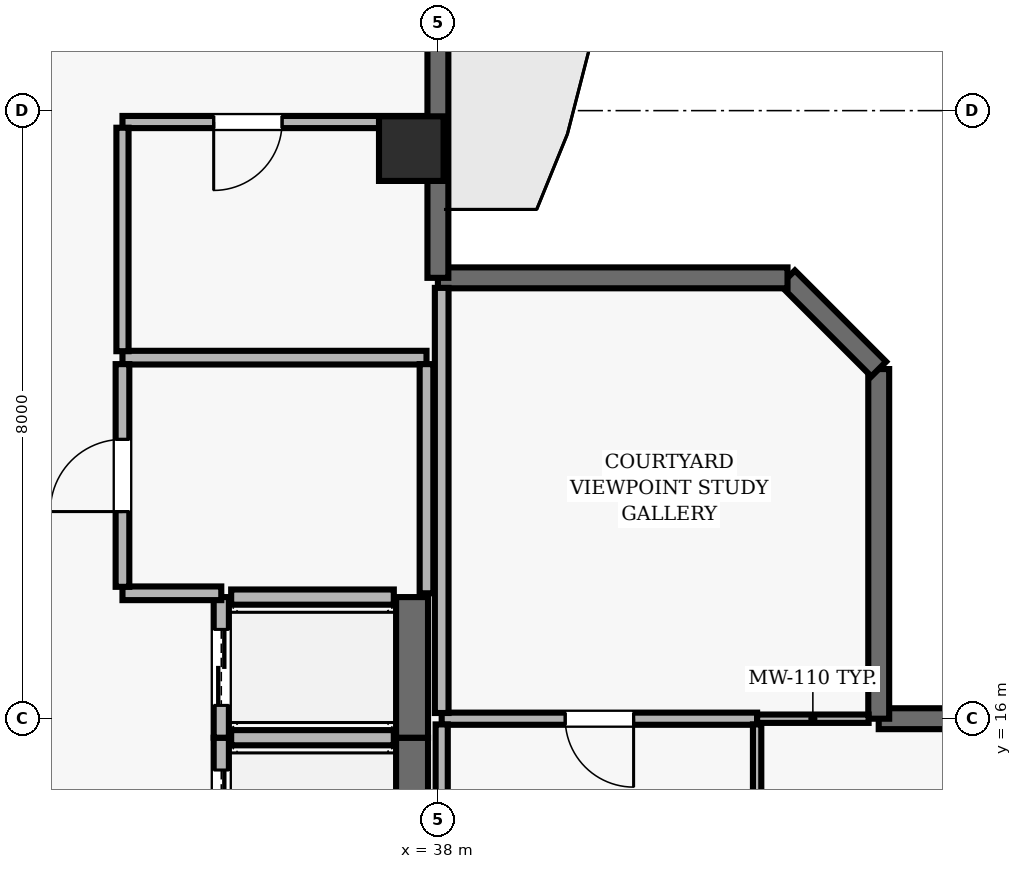
"""IFC4 building model, lengths in metres.
Left out: names, types, materials, properties, quantities, classifications, styles, units other than length and angle.
Written with IfcOpenShell. Run it as: python <this file> out.ifc"""

import sys

from ifc_helpers import new_model, si_unit, direction, frame, frame_2d, origin, origin_2d, place, context, subcontext, project, spatial, rectangle, extrude, element, fill, save


model = new_model("IFC4")
c1 = context("Model", 3, precision=1e-05, world=origin(), true_north=direction((0.0, 1.0)))
c2 = subcontext(c1, "Body", "Model", "MODEL_VIEW")
j1 = project(units=[si_unit("LENGTHUNIT", "METRE"), si_unit("PLANEANGLEUNIT", "RADIAN")], contexts=[c1])
p1 = place(None, origin())
s1 = spatial("IfcSite", under=j1, at=p1, CompositionType="ELEMENT")
p2 = place(p1, origin())
s2 = spatial("IfcBuilding", under=s1, at=p2, CompositionType="ELEMENT")
p3 = place(p2, frame((0.0, 0.0, 306.7)))
s3 = spatial("IfcBuildingStorey", under=s2, at=p3, CompositionType="ELEMENT", Elevation=306.7)
p4 = place(p3, frame((37.65, 23.5, 0.0), z_axis=(0.0, 0.0, 1.0), x_axis=(1.0, 0.0, 0.0)))
e1 = element("IfcColumn", 1, at=p4, inside=s3, PredefinedType="COLUMN", context=c2, shape_type="SweptSolid", body=[
    extrude(rectangle(XDim=0.85, YDim=0.85, at=origin_2d()), origin(), (0.0, 0.0, 1.0), 5.0),
])
p5 = place(p3, frame((57.3, 16.0, 0.0), z_axis=(0.0, 0.0, 1.0), x_axis=(-1.0, 0.0, 0.0)))
e2 = element("IfcWall", 2, at=p5, inside=s3, PredefinedType="SOLIDWALL", context=c2, shape_type="SweptSolid", body=[
    extrude(rectangle(XDim=13.5, YDim=0.275, at=frame_2d((6.75, 0.0))), origin(), (0.0, 0.0, 1.0), 4.74),
])
p6 = place(p5, frame((7.05, 0.0, 0.0)))
e3 = element("IfcOpeningElement", 3, at=p6, cuts=e2, PredefinedType="OPENING", context=c2, shape_type="SweptSolid", body=[
    extrude(rectangle(XDim=1.0, YDim=2.2, at=frame_2d((0.5, 1.1))), frame((0.0, 0.147, 0.0), z_axis=(0.0, -1.0, 0.0), x_axis=(1.0, 0.0, 0.0)), (0.0, 0.0, 1.0), 0.295),
])
p7 = place(p5, frame((2.175, 0.0, 0.9)))
e4 = element("IfcOpeningElement", 4, at=p7, cuts=e2, PredefinedType="OPENING", context=c2, shape_type="SweptSolid", body=[
    extrude(rectangle(XDim=2.4, YDim=1.8, at=frame_2d((1.2, 0.9))), frame((0.0, 0.147, 0.0), z_axis=(0.0, -1.0, 0.0), x_axis=(1.0, 0.0, 0.0)), (0.0, 0.0, 1.0), 0.295),
])
p8 = place(p3, frame((43.8, 16.0, 0.0), z_axis=(0.0, 0.0, 1.0), x_axis=(0.0, 1.0, 0.0)))
e5 = element("IfcWall", 5, at=p8, inside=s3, PredefinedType="SOLIDWALL", context=c2, shape_type="SweptSolid", body=[
    extrude(rectangle(XDim=4.6, YDim=0.275, at=frame_2d((2.3, 0.0))), origin(), (0.0, 0.0, 1.0), 4.74),
])
p9 = place(p3, frame((43.8, 20.6, 0.0), z_axis=(0.0, 0.0, 1.0), x_axis=(-0.707106781187, 0.707106781187, 0.0)))
e6 = element("IfcWall", 6, at=p9, inside=s3, PredefinedType="SOLIDWALL", context=c2, shape_type="SweptSolid", body=[
    extrude(rectangle(XDim=1.697, YDim=0.275, at=frame_2d((0.849, 0.0))), origin(), (0.0, 0.0, 1.0), 4.74),
])
p10 = place(p3, frame((42.6, 21.8, 0.0), z_axis=(0.0, 0.0, 1.0), x_axis=(-1.0, 0.0, 0.0)))
e7 = element("IfcWall", 7, at=p10, inside=s3, PredefinedType="SOLIDWALL", context=c2, shape_type="SweptSolid", body=[
    extrude(rectangle(XDim=4.6, YDim=0.275, at=frame_2d((2.3, 0.0))), origin(), (0.0, 0.0, 1.0), 4.74),
])
p11 = place(p3, frame((38.0, 21.8, 0.0), z_axis=(0.0, 0.0, 1.0), x_axis=(0.0, 1.0, 0.0)))
e8 = element("IfcWall", 8, at=p11, inside=s3, PredefinedType="SOLIDWALL", context=c2, shape_type="SweptSolid", body=[
    extrude(rectangle(XDim=13.5, YDim=0.275, at=frame_2d((6.75, 0.0))), origin(), (0.0, 0.0, 1.0), 4.74),
])
p12 = place(p11, frame((5.25, 0.0, 0.0)))
e9 = element("IfcOpeningElement", 9, at=p12, cuts=e8, PredefinedType="OPENING", context=c2, shape_type="SweptSolid", body=[
    extrude(rectangle(XDim=1.0, YDim=2.2, at=frame_2d((0.5, 1.1))), frame((0.0, 0.147, 0.0), z_axis=(0.0, -1.0, 0.0), x_axis=(1.0, 0.0, 0.0)), (0.0, 0.0, 1.0), 0.295),
])
p13 = place(p11, frame((8.625, 0.0, 0.9)))
e10 = element("IfcOpeningElement", 10, at=p13, cuts=e8, PredefinedType="OPENING", context=c2, shape_type="SweptSolid", body=[
    extrude(rectangle(XDim=3.0, YDim=2.2, at=frame_2d((1.5, 1.1))), frame((0.0, 0.147, 0.0), z_axis=(0.0, -1.0, 0.0), x_axis=(1.0, 0.0, 0.0)), (0.0, 0.0, 1.0), 0.295),
])
p14 = place(p3, frame((35.15, 15.75, 0.0), z_axis=(0.0, 0.0, 1.0), x_axis=(0.0, -1.0, 0.0)))
e11 = element("IfcWall", 11, at=p14, inside=s3, PredefinedType="SOLIDWALL", context=c2, shape_type="SweptSolid", body=[
    extrude(rectangle(XDim=1.85, YDim=0.2, at=frame_2d((0.925, 0.0))), origin(), (0.0, 0.0, 1.0), 4.74),
])
p15 = place(p14, frame((0.425, 0.0, 0.0)))
e12 = element("IfcOpeningElement", 12, at=p15, cuts=e11, PredefinedType="OPENING", context=c2, shape_type="SweptSolid", body=[
    extrude(rectangle(XDim=1.0, YDim=2.1, at=frame_2d((0.5, 1.05))), frame((0.0, 0.11, 0.0), z_axis=(0.0, -1.0, 0.0), x_axis=(1.0, 0.0, 0.0)), (0.0, 0.0, 1.0), 0.22),
])
p16 = place(p3, frame((37.66, 13.9, 0.0), z_axis=(0.0, 0.0, 1.0), x_axis=(0.0, 1.0, 0.0)))
e13 = element("IfcWall", 13, at=p16, inside=s3, PredefinedType="SHEAR", context=c2, shape_type="SweptSolid", body=[
    extrude(rectangle(XDim=1.85, YDim=0.42, at=frame_2d((0.925, 0.0))), origin(), (0.0, 0.0, 1.0), 4.74),
])
p17 = place(p3, frame((37.42, 15.75, 0.0), z_axis=(0.0, 0.0, 1.0), x_axis=(-1.0, 0.0, 0.0)))
e14 = element("IfcWall", 14, at=p17, inside=s3, PredefinedType="SOLIDWALL", context=c2, shape_type="SweptSolid", body=[
    extrude(rectangle(XDim=2.14, YDim=0.2, at=frame_2d((1.07, 0.0))), origin(), (0.0, 0.0, 1.0), 4.74),
])
p18 = place(p3, frame((35.15, 17.6, 0.0), z_axis=(0.0, 0.0, 1.0), x_axis=(0.0, -1.0, 0.0)))
e15 = element("IfcWall", 15, at=p18, inside=s3, PredefinedType="SOLIDWALL", context=c2, shape_type="SweptSolid", body=[
    extrude(rectangle(XDim=1.85, YDim=0.2, at=frame_2d((0.925, 0.0))), origin(), (0.0, 0.0, 1.0), 4.74),
])
p19 = place(p18, frame((0.425, 0.0, 0.0)))
e16 = element("IfcOpeningElement", 16, at=p19, cuts=e15, PredefinedType="OPENING", context=c2, shape_type="SweptSolid", body=[
    extrude(rectangle(XDim=1.0, YDim=2.1, at=frame_2d((0.5, 1.05))), frame((0.0, 0.11, 0.0), z_axis=(0.0, -1.0, 0.0), x_axis=(1.0, 0.0, 0.0)), (0.0, 0.0, 1.0), 0.22),
])
p20 = place(p3, frame((37.66, 15.75, 0.0), z_axis=(0.0, 0.0, 1.0), x_axis=(0.0, 1.0, 0.0)))
e17 = element("IfcWall", 17, at=p20, inside=s3, PredefinedType="SHEAR", context=c2, shape_type="SweptSolid", body=[
    extrude(rectangle(XDim=1.85, YDim=0.42, at=frame_2d((0.925, 0.0))), origin(), (0.0, 0.0, 1.0), 4.74),
])
p21 = place(p3, frame((37.42, 17.6, 0.0), z_axis=(0.0, 0.0, 1.0), x_axis=(-1.0, 0.0, 0.0)))
e18 = element("IfcWall", 18, at=p21, inside=s3, PredefinedType="SOLIDWALL", context=c2, shape_type="SweptSolid", body=[
    extrude(rectangle(XDim=2.14, YDim=0.2, at=frame_2d((1.07, 0.0))), origin(), (0.0, 0.0, 1.0), 4.74),
])
p22 = place(p3, frame((33.85, 17.65, 0.0), z_axis=(0.0, 0.0, 1.0), x_axis=(1.0, 0.0, 0.0)))
e19 = element("IfcWall", 19, at=p22, inside=s3, PredefinedType="PARTITIONING", context=c2, shape_type="SweptSolid", body=[
    extrude(rectangle(XDim=1.3, YDim=0.18, at=frame_2d((0.65, 0.0))), origin(), (0.0, 0.0, 1.0), 4.74),
])
p23 = place(p3, frame((37.85, 20.75, 0.0), z_axis=(0.0, 0.0, 1.0), x_axis=(-1.0, 0.0, 0.0)))
e20 = element("IfcWall", 20, at=p23, inside=s3, PredefinedType="PARTITIONING", context=c2, shape_type="SweptSolid", body=[
    extrude(rectangle(XDim=4.0, YDim=0.18, at=frame_2d((2.0, 0.0))), origin(), (0.0, 0.0, 1.0), 4.74),
])
p24 = place(p3, frame((37.85, 23.85, 0.0), z_axis=(0.0, 0.0, 1.0), x_axis=(-1.0, 0.0, 0.0)))
e21 = element("IfcWall", 21, at=p24, inside=s3, PredefinedType="PARTITIONING", context=c2, shape_type="SweptSolid", body=[
    extrude(rectangle(XDim=4.0, YDim=0.16, at=frame_2d((2.0, 0.0))), origin(), (0.0, 0.0, 1.0), 4.277),
])
p25 = place(p24, frame((1.9, 0.0, 0.0)))
e22 = element("IfcOpeningElement", 22, at=p25, cuts=e21, PredefinedType="OPENING", context=c2, shape_type="SweptSolid", body=[
    extrude(rectangle(XDim=0.9, YDim=2.1, at=frame_2d((0.45, 1.05))), frame((0.0, 0.09, 0.0), z_axis=(0.0, -1.0, 0.0), x_axis=(1.0, 0.0, 0.0)), (0.0, 0.0, 1.0), 0.18),
])
p26 = place(p3, frame((42.2, 16.0, 0.0), z_axis=(0.0, 0.0, 1.0), x_axis=(-1.0, 0.0, 0.0)))
e23 = element("IfcWall", 23, at=p26, inside=s3, PredefinedType="PARTITIONING", context=c2, shape_type="SweptSolid", body=[
    extrude(rectangle(XDim=4.15, YDim=0.16, at=frame_2d((2.075, 0.0))), origin(), (0.0, 0.0, 1.0), 4.44),
])
p27 = place(p26, frame((1.625, 0.0, 0.0)))
e24 = element("IfcOpeningElement", 24, at=p27, cuts=e23, PredefinedType="OPENING", context=c2, shape_type="SweptSolid", body=[
    extrude(rectangle(XDim=0.9, YDim=2.1, at=frame_2d((0.45, 1.05))), frame((0.0, 0.09, 0.0), z_axis=(0.0, -1.0, 0.0), x_axis=(1.0, 0.0, 0.0)), (0.0, 0.0, 1.0), 0.18),
])
p28 = place(p3, frame((42.2, 16.0, 0.0), z_axis=(0.0, 0.0, 1.0), x_axis=(1.0, 0.0, 0.0)))
e25 = element("IfcWall", 25, at=p28, inside=s3, PredefinedType="MOVABLE", context=c2, shape_type="SweptSolid", body=[
    extrude(rectangle(XDim=1.467, YDim=0.11, at=frame_2d((0.733, 0.0))), origin(), (0.0, 0.0, 1.0), 4.44),
])
p29 = place(p3, frame((33.85, 17.735, 0.0), z_axis=(0.0, 0.0, 1.0), x_axis=(0.0, 1.0, 0.0)))
e26 = element("IfcWall", 26, at=p29, inside=s3, PredefinedType="PARTITIONING", context=c2, shape_type="SweptSolid", body=[
    extrude(rectangle(XDim=2.93, YDim=0.18, at=frame_2d((1.465, 0.0))), origin(), (0.0, 0.0, 1.0), 4.74),
])
p30 = place(p29, frame((0.99, 0.0, 0.0)))
e27 = element("IfcOpeningElement", 27, at=p30, cuts=e26, PredefinedType="OPENING", context=c2, shape_type="SweptSolid", body=[
    extrude(rectangle(XDim=0.95, YDim=2.1, at=frame_2d((0.475, 1.05))), frame((0.0, 0.1, 0.0), z_axis=(0.0, -1.0, 0.0), x_axis=(1.0, 0.0, 0.0)), (0.0, 0.0, 1.0), 0.2),
])
p31 = place(p3, frame((33.85, 20.835, 0.0), z_axis=(0.0, 0.0, 1.0), x_axis=(0.0, 1.0, 0.0)))
e28 = element("IfcWall", 28, at=p31, inside=s3, PredefinedType="PARTITIONING", context=c2, shape_type="SweptSolid", body=[
    extrude(rectangle(XDim=2.94, YDim=0.16, at=frame_2d((1.47, 0.0))), origin(), (0.0, 0.0, 1.0), 4.74),
])
p32 = place(p3, frame((37.85, 17.65, 0.0), z_axis=(0.0, 0.0, 1.0), x_axis=(0.0, 1.0, 0.0)))
e29 = element("IfcWall", 29, at=p32, inside=s3, PredefinedType="PARTITIONING", context=c2, shape_type="SweptSolid", body=[
    extrude(rectangle(XDim=3.015, YDim=0.18, at=frame_2d((1.508, 0.0))), origin(), (0.0, 0.0, 1.0), 4.277),
])
p33 = place(p3, frame((38.05, 15.925, 0.0), z_axis=(0.0, 0.0, 1.0), x_axis=(0.0, -1.0, 0.0)))
e30 = element("IfcWall", 30, at=p33, inside=s3, PredefinedType="PARTITIONING", context=c2, shape_type="SweptSolid", body=[
    extrude(rectangle(XDim=6.375, YDim=0.16, at=frame_2d((3.188, 0.0))), origin(), (0.0, 0.0, 1.0), 4.277),
])
p34 = place(p3, frame((38.05, 21.668, 0.0), z_axis=(0.0, 0.0, 1.0), x_axis=(0.0, -1.0, 0.0)))
e31 = element("IfcWall", 31, at=p34, inside=s3, PredefinedType="PARTITIONING", context=c2, shape_type="SweptSolid", body=[
    extrude(rectangle(XDim=5.593, YDim=0.18, at=frame_2d((2.796, 0.0))), origin(), (0.0, 0.0, 1.0), 4.277),
])
p35 = place(p3, frame((42.2, 10.525, 0.0), z_axis=(0.0, 0.0, 1.0), x_axis=(0.0, 1.0, 0.0)))
e32 = element("IfcWall", 32, at=p35, inside=s3, PredefinedType="MOVABLE", context=c2, shape_type="SweptSolid", body=[
    extrude(rectangle(XDim=5.4, YDim=0.11, at=frame_2d((2.7, 0.0))), origin(), (0.0, 0.0, 1.0), 4.74),
])
p36 = place(p35, frame((2.25, 0.0, 0.0)))
e33 = element("IfcOpeningElement", 33, at=p36, cuts=e32, PredefinedType="OPENING", context=c2, shape_type="SweptSolid", body=[
    extrude(rectangle(XDim=0.9, YDim=2.1, at=frame_2d((0.45, 1.05))), frame((0.0, 0.065, 0.0), z_axis=(0.0, -1.0, 0.0), x_axis=(1.0, 0.0, 0.0)), (0.0, 0.0, 1.0), 0.13),
])
p37 = place(p15, origin())
e34 = element("IfcDoor", 34, at=p37, inside=s3, OperationType="DOUBLE_DOOR_SLIDING", PredefinedType="DOOR", context=c2, shape_type="SweptSolid", body=[
    extrude(rectangle(XDim=1.0, YDim=2.1, at=frame_2d((0.5, 1.05))), frame((0.0, 0.025, 0.0), z_axis=(0.0, -1.0, 0.0), x_axis=(1.0, 0.0, 0.0)), (0.0, 0.0, 1.0), 0.05),
])
fill(e12, e34)
p38 = place(p19, origin())
e35 = element("IfcDoor", 35, at=p38, inside=s3, OperationType="DOUBLE_DOOR_SLIDING", PredefinedType="DOOR", context=c2, shape_type="SweptSolid", body=[
    extrude(rectangle(XDim=1.0, YDim=2.1, at=frame_2d((0.5, 1.05))), frame((0.0, 0.025, 0.0), z_axis=(0.0, -1.0, 0.0), x_axis=(1.0, 0.0, 0.0)), (0.0, 0.0, 1.0), 0.05),
])
fill(e16, e35)
p39 = place(p30, origin())
e36 = element("IfcDoor", 36, at=p39, inside=s3, OperationType="SINGLE_SWING_LEFT", PredefinedType="DOOR", context=c2, shape_type="SweptSolid", body=[
    extrude(rectangle(XDim=0.95, YDim=2.1, at=frame_2d((0.475, 1.05))), frame((0.0, 0.025, 0.0), z_axis=(0.0, -1.0, 0.0), x_axis=(1.0, 0.0, 0.0)), (0.0, 0.0, 1.0), 0.05),
])
fill(e27, e36)
p40 = place(p25, origin())
e37 = element("IfcDoor", 37, at=p40, inside=s3, OperationType="SINGLE_SWING_RIGHT", PredefinedType="DOOR", context=c2, shape_type="SweptSolid", body=[
    extrude(rectangle(XDim=0.9, YDim=2.1, at=frame_2d((0.45, 1.05))), frame((0.0, 0.025, 0.0), z_axis=(0.0, -1.0, 0.0), x_axis=(1.0, 0.0, 0.0)), (0.0, 0.0, 1.0), 0.05),
])
fill(e22, e37)
p41 = place(p27, origin())
e38 = element("IfcDoor", 38, at=p41, inside=s3, OperationType="SINGLE_SWING_LEFT", PredefinedType="DOOR", context=c2, shape_type="SweptSolid", body=[
    extrude(rectangle(XDim=0.9, YDim=2.1, at=frame_2d((0.45, 1.05))), frame((0.0, 0.025, 0.0), z_axis=(0.0, -1.0, 0.0), x_axis=(1.0, 0.0, 0.0)), (0.0, 0.0, 1.0), 0.05),
])
fill(e24, e38)
save(model, sys.argv[1])
